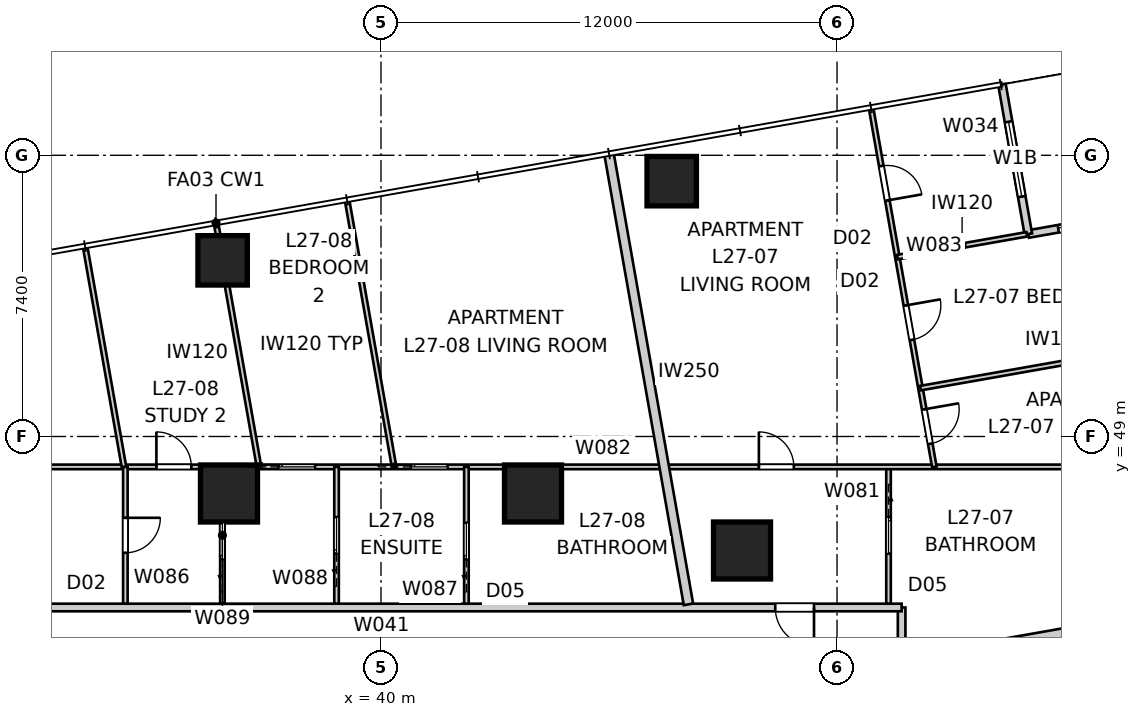
"""IFC4 building model, lengths in metres.
Left out: names, types, materials, properties, quantities, classifications, styles, units other than length and angle.
Written with IfcOpenShell. Run it as: python <this file> out.ifc"""

import sys

from ifc_helpers import new_model, si_unit, direction, frame, frame_2d, origin, origin_2d, place, context, subcontext, project, spatial, rectangle, extrude, element, fill, save


model = new_model("IFC4")
c1 = context("Model", 3, precision=1e-05, world=origin(), true_north=direction((0.0, 1.0)))
c2 = subcontext(c1, "Body", "Model", "MODEL_VIEW")
j1 = project(units=[si_unit("LENGTHUNIT", "METRE"), si_unit("PLANEANGLEUNIT", "RADIAN")], contexts=[c1])
p1 = place(None, origin())
s1 = spatial("IfcSite", under=j1, at=p1, CompositionType="ELEMENT")
p2 = place(p1, origin())
s2 = spatial("IfcBuilding", under=s1, at=p2, CompositionType="ELEMENT")
p3 = place(p2, frame((0.0, 0.0, 99.8)))
s3 = spatial("IfcBuildingStorey", under=s2, at=p3, CompositionType="ELEMENT", Elevation=99.8)
for number, where, z_axis, x_axis in (
    (1, (47.65, 55.719, 0.0), (0.0, 0.0, 1.0), (1.0, 0.0, 0.0)),
    (2, (35.833, 53.635, 0.0), (0.0, 0.0, 1.0), (1.0, 0.0, 0.0)),
):
    element("IfcColumn", number, at=place(p3, frame(where, z_axis=z_axis, x_axis=x_axis)), inside=s3, PredefinedType="COLUMN", context=c2, shape_type="SweptSolid", body=[
        extrude(rectangle(XDim=1.3, YDim=1.3, at=origin_2d()), origin(), (0.0, 0.0, 1.0), 3.4),
    ])
for number, where, z_axis, x_axis in (
    (3, (49.5, 46.0, 0.0), (0.0, 0.0, 1.0), (1.0, 0.0, 0.0)),
    (4, (44.0, 47.5, 0.0), (0.0, 0.0, 1.0), (1.0, 0.0, 0.0)),
    (5, (36.0, 47.5, 0.0), (0.0, 0.0, 1.0), (1.0, 0.0, 0.0)),
):
    element("IfcColumn", number, at=place(p3, frame(where, z_axis=z_axis, x_axis=x_axis)), inside=s3, PredefinedType="COLUMN", context=c2, shape_type="SweptSolid", body=[
        extrude(rectangle(XDim=1.5, YDim=1.5, at=origin_2d()), origin(), (0.0, 0.0, 1.0), 3.4),
    ])
p4 = place(p3, frame((60.974, 55.022, 0.0), z_axis=(0.0, 0.0, 1.0), x_axis=(-0.984808127031, -0.173646056486, 0.0)))
e6 = element("IfcWall", 6, at=p4, inside=s3, PredefinedType="SOLIDWALL", context=c2, shape_type="SweptSolid", body=[
    extrude(rectangle(XDim=4.0, YDim=0.2, at=frame_2d((2.0, 0.0))), origin(), (0.0, 0.0, 1.0), 3.25),
])
p5 = place(p4, frame((0.8, 0.0, 0.0)))
e7 = element("IfcOpeningElement", 7, at=p5, cuts=e6, PredefinedType="OPENING", context=c2, shape_type="SweptSolid", body=[
    extrude(rectangle(XDim=2.4, YDim=2.1, at=frame_2d((1.2, 1.05))), frame((0.0, 0.11, 0.0), z_axis=(0.0, -1.0, 0.0), x_axis=(1.0, 0.0, 0.0)), (0.0, 0.0, 1.0), 0.22),
])
p6 = place(p3, frame((57.034, 54.328, 0.0), z_axis=(0.0, 0.0, 1.0), x_axis=(-0.173646056486, 0.984808127031, 0.0)))
e8 = element("IfcWall", 8, at=p6, inside=s3, PredefinedType="SOLIDWALL", context=c2, shape_type="SweptSolid", body=[
    extrude(rectangle(XDim=4.0, YDim=0.2, at=frame_2d((2.0, 0.0))), origin(), (0.0, 0.0, 1.0), 3.25),
])
p7 = place(p6, frame((1.0, 0.0, 0.45)))
e9 = element("IfcOpeningElement", 9, at=p7, cuts=e8, PredefinedType="OPENING", context=c2, shape_type="SweptSolid", body=[
    extrude(rectangle(XDim=2.0, YDim=1.8, at=frame_2d((1.0, 0.9))), frame((0.0, 0.11, 0.0), z_axis=(0.0, -1.0, 0.0), x_axis=(1.0, 0.0, 0.0)), (0.0, 0.0, 1.0), 0.22),
])
p8 = place(p3, frame((53.7, 15.5, 0.0), z_axis=(0.0, 0.0, 1.0), x_axis=(0.0, 1.0, 0.0)))
e10 = element("IfcWall", 10, at=p8, inside=s3, PredefinedType="PARTITIONING", context=c2, shape_type="SweptSolid", body=[
    extrude(rectangle(XDim=29.0, YDim=0.2, at=frame_2d((14.5, 0.0))), origin(), (0.0, 0.0, 1.0), 3.25),
])
p9 = place(p8, frame((24.248, 0.0, 0.0)))
e11 = element("IfcOpeningElement", 11, at=p9, cuts=e10, PredefinedType="OPENING", context=c2, shape_type="SweptSolid", body=[
    extrude(rectangle(XDim=1.02, YDim=2.34, at=frame_2d((0.51, 1.17))), frame((0.0, 0.11, 0.0), z_axis=(0.0, -1.0, 0.0), x_axis=(1.0, 0.0, 0.0)), (0.0, 0.0, 1.0), 0.22),
])
p10 = place(p8, frame((2.976, 0.0, 0.0)))
e12 = element("IfcOpeningElement", 12, at=p10, cuts=e10, PredefinedType="OPENING", context=c2, shape_type="SweptSolid", body=[
    extrude(rectangle(XDim=1.02, YDim=2.1, at=frame_2d((0.51, 1.05))), frame((0.0, 0.11, 0.0), z_axis=(0.0, -1.0, 0.0), x_axis=(1.0, 0.0, 0.0)), (0.0, 0.0, 1.0), 0.22),
])
p11 = place(p8, frame((8.092, 0.0, 0.0)))
e13 = element("IfcOpeningElement", 13, at=p11, cuts=e10, PredefinedType="OPENING", context=c2, shape_type="SweptSolid", body=[
    extrude(rectangle(XDim=1.02, YDim=2.34, at=frame_2d((0.51, 1.17))), frame((0.0, 0.11, 0.0), z_axis=(0.0, -1.0, 0.0), x_axis=(1.0, 0.0, 0.0)), (0.0, 0.0, 1.0), 0.22),
])
p12 = place(p3, frame((53.7, 44.5, 0.0), z_axis=(0.0, 0.0, 1.0), x_axis=(-1.0, 0.0, 0.0)))
e14 = element("IfcWall", 14, at=p12, inside=s3, PredefinedType="PARTITIONING", context=c2, shape_type="SweptSolid", body=[
    extrude(rectangle(XDim=27.4, YDim=0.2, at=frame_2d((13.7, 0.0))), origin(), (0.0, 0.0, 1.0), 3.25),
])
p13 = place(p12, frame((24.056, 0.0, 0.0)))
e15 = element("IfcOpeningElement", 15, at=p13, cuts=e14, PredefinedType="OPENING", context=c2, shape_type="SweptSolid", body=[
    extrude(rectangle(XDim=1.02, YDim=2.1, at=frame_2d((0.51, 1.05))), frame((0.0, 0.11, 0.0), z_axis=(0.0, -1.0, 0.0), x_axis=(1.0, 0.0, 0.0)), (0.0, 0.0, 1.0), 0.22),
])
p14 = place(p12, frame((2.305, 0.0, 0.0)))
e16 = element("IfcOpeningElement", 16, at=p14, cuts=e14, PredefinedType="OPENING", context=c2, shape_type="SweptSolid", body=[
    extrude(rectangle(XDim=1.02, YDim=2.1, at=frame_2d((0.51, 1.05))), frame((0.0, 0.11, 0.0), z_axis=(0.0, -1.0, 0.0), x_axis=(1.0, 0.0, 0.0)), (0.0, 0.0, 1.0), 0.22),
])
p15 = place(p3, frame((62.797, 44.682, 0.0), z_axis=(0.0, 0.0, 1.0), x_axis=(-0.984810933893, -0.173630137029, 0.0)))
e17 = element("IfcWall", 17, at=p15, inside=s3, PredefinedType="PARTITIONING", context=c2, shape_type="SweptSolid", body=[
    extrude(rectangle(XDim=9.154, YDim=0.25, at=frame_2d((4.577, 0.0))), origin(), (0.0, 0.0, 1.0), 3.25),
])
p16 = place(p3, frame((45.999, 56.444, 0.0), z_axis=(0.0, 0.0, 1.0), x_axis=(0.173654664517, -0.984806609184, 0.0)))
e18 = element("IfcWall", 18, at=p16, inside=s3, PredefinedType="PARTITIONING", context=c2, shape_type="SweptSolid", body=[
    extrude(rectangle(XDim=12.044, YDim=0.25, at=frame_2d((6.022, 0.0))), origin(), (0.0, 0.0, 1.0), 3.25),
])
p17 = place(p3, frame((53.355, 48.2, 0.0), z_axis=(0.0, 0.0, 1.0), x_axis=(0.0, -1.0, 0.0)))
e19 = element("IfcWall", 19, at=p17, inside=s3, PredefinedType="PARTITIONING", context=c2, shape_type="SweptSolid", body=[
    extrude(rectangle(XDim=3.6, YDim=0.12, at=frame_2d((1.8, 0.0))), origin(), (0.0, 0.0, 1.0), 3.25),
])
p18 = place(p17, frame((1.32, 0.0, 0.0)))
e20 = element("IfcOpeningElement", 20, at=p18, cuts=e19, PredefinedType="OPENING", context=c2, shape_type="SweptSolid", body=[
    extrude(rectangle(XDim=0.96, YDim=2.1, at=frame_2d((0.48, 1.05))), frame((0.0, 0.07, 0.0), z_axis=(0.0, -1.0, 0.0), x_axis=(1.0, 0.0, 0.0)), (0.0, 0.0, 1.0), 0.14),
])
p19 = place(p3, frame((21.8, 48.2, 0.0), z_axis=(0.0, 0.0, 1.0), x_axis=(1.0, 0.0, 0.0)))
e21 = element("IfcWall", 21, at=p19, inside=s3, PredefinedType="PARTITIONING", context=c2, shape_type="SweptSolid", body=[
    extrude(rectangle(XDim=36.4, YDim=0.12, at=frame_2d((18.2, 0.0))), origin(), (0.0, 0.0, 1.0), 3.25),
])
p20 = place(p19, frame((7.441, 0.0, 0.0)))
e22 = element("IfcOpeningElement", 22, at=p20, cuts=e21, PredefinedType="OPENING", context=c2, shape_type="SweptSolid", body=[
    extrude(rectangle(XDim=0.92, YDim=2.34, at=frame_2d((0.46, 1.17))), frame((0.0, 0.07, 0.0), z_axis=(0.0, -1.0, 0.0), x_axis=(1.0, 0.0, 0.0)), (0.0, 0.0, 1.0), 0.14),
])
p21 = place(p19, frame((28.144, 0.0, 0.0)))
e23 = element("IfcOpeningElement", 23, at=p21, cuts=e21, PredefinedType="OPENING", context=c2, shape_type="SweptSolid", body=[
    extrude(rectangle(XDim=0.92, YDim=2.34, at=frame_2d((0.46, 1.17))), frame((0.0, 0.07, 0.0), z_axis=(0.0, -1.0, 0.0), x_axis=(1.0, 0.0, 0.0)), (0.0, 0.0, 1.0), 0.14),
])
p22 = place(p19, frame((12.29, 0.0, 0.0)))
e24 = element("IfcOpeningElement", 24, at=p22, cuts=e21, PredefinedType="OPENING", context=c2, shape_type="SweptSolid", body=[
    extrude(rectangle(XDim=0.92, YDim=2.34, at=frame_2d((0.46, 1.17))), frame((0.0, 0.07, 0.0), z_axis=(0.0, -1.0, 0.0), x_axis=(1.0, 0.0, 0.0)), (0.0, 0.0, 1.0), 0.14),
])
p23 = place(p19, frame((15.505, 0.0, 0.0)))
e25 = element("IfcOpeningElement", 25, at=p23, cuts=e21, PredefinedType="OPENING", context=c2, shape_type="SweptSolid", body=[
    extrude(rectangle(XDim=0.96, YDim=2.1, at=frame_2d((0.48, 1.05))), frame((0.0, 0.07, 0.0), z_axis=(0.0, -1.0, 0.0), x_axis=(1.0, 0.0, 0.0)), (0.0, 0.0, 1.0), 0.14),
])
p24 = place(p19, frame((18.991, 0.0, 0.0)))
e26 = element("IfcOpeningElement", 26, at=p24, cuts=e21, PredefinedType="OPENING", context=c2, shape_type="SweptSolid", body=[
    extrude(rectangle(XDim=0.96, YDim=2.1, at=frame_2d((0.48, 1.05))), frame((0.0, 0.07, 0.0), z_axis=(0.0, -1.0, 0.0), x_axis=(1.0, 0.0, 0.0)), (0.0, 0.0, 1.0), 0.14),
])
p25 = place(p3, frame((52.9, 57.62, 0.0), z_axis=(0.0, 0.0, 1.0), x_axis=(0.173642635155, -0.984808730291, 0.0)))
e27 = element("IfcWall", 27, at=p25, inside=s3, PredefinedType="PARTITIONING", context=c2, shape_type="SweptSolid", body=[
    extrude(rectangle(XDim=9.565, YDim=0.12, at=frame_2d((4.782, 0.0))), origin(), (0.0, 0.0, 1.0), 3.25),
])
p26 = place(p25, frame((1.525, 0.0, 0.0)))
e28 = element("IfcOpeningElement", 28, at=p26, cuts=e27, PredefinedType="OPENING", context=c2, shape_type="SweptSolid", body=[
    extrude(rectangle(XDim=0.92, YDim=2.34, at=frame_2d((0.46, 1.17))), frame((0.0, 0.07, 0.0), z_axis=(0.0, -1.0, 0.0), x_axis=(1.0, 0.0, 0.0)), (0.0, 0.0, 1.0), 0.14),
])
p27 = place(p25, frame((5.25, 0.0, 0.0)))
e29 = element("IfcOpeningElement", 29, at=p27, cuts=e27, PredefinedType="OPENING", context=c2, shape_type="SweptSolid", body=[
    extrude(rectangle(XDim=0.92, YDim=2.34, at=frame_2d((0.46, 1.17))), frame((0.0, 0.07, 0.0), z_axis=(0.0, -1.0, 0.0), x_axis=(1.0, 0.0, 0.0)), (0.0, 0.0, 1.0), 0.14),
])
p28 = place(p25, frame((8.028, 0.0, 0.0)))
e30 = element("IfcOpeningElement", 30, at=p28, cuts=e27, PredefinedType="OPENING", context=c2, shape_type="SweptSolid", body=[
    extrude(rectangle(XDim=0.92, YDim=2.34, at=frame_2d((0.46, 1.17))), frame((0.0, 0.07, 0.0), z_axis=(0.0, -1.0, 0.0), x_axis=(1.0, 0.0, 0.0)), (0.0, 0.0, 1.0), 0.14),
])
p29 = place(p3, frame((54.195, 50.273, 0.0), z_axis=(0.0, 0.0, 1.0), x_axis=(0.984807929323, 0.173647177755, 0.0)))
e31 = element("IfcWall", 31, at=p29, inside=s3, PredefinedType="PARTITIONING", context=c2, shape_type="SweptSolid", body=[
    extrude(rectangle(XDim=7.46, YDim=0.12, at=frame_2d((3.73, 0.0))), origin(), (0.0, 0.0, 1.0), 3.25),
])
p30 = place(p3, frame((53.588, 53.72, 0.0), z_axis=(0.0, 0.0, 1.0), x_axis=(0.984805572884, 0.173660541335, 0.0)))
e32 = element("IfcWall", 32, at=p30, inside=s3, PredefinedType="PARTITIONING", context=c2, shape_type="SweptSolid", body=[
    extrude(rectangle(XDim=3.46, YDim=0.12, at=frame_2d((1.73, 0.0))), origin(), (0.0, 0.0, 1.0), 3.25),
])
p31 = place(p3, frame((33.273, 48.2, 0.0), z_axis=(0.0, 0.0, 1.0), x_axis=(0.0, -1.0, 0.0)))
e33 = element("IfcWall", 33, at=p31, inside=s3, PredefinedType="PARTITIONING", context=c2, shape_type="SweptSolid", body=[
    extrude(rectangle(XDim=3.6, YDim=0.12, at=frame_2d((1.8, 0.0))), origin(), (0.0, 0.0, 1.0), 3.25),
])
p32 = place(p31, frame((1.34, 0.0, 0.0)))
e34 = element("IfcOpeningElement", 34, at=p32, cuts=e33, PredefinedType="OPENING", context=c2, shape_type="SweptSolid", body=[
    extrude(rectangle(XDim=0.92, YDim=2.34, at=frame_2d((0.46, 1.17))), frame((0.0, 0.07, 0.0), z_axis=(0.0, -1.0, 0.0), x_axis=(1.0, 0.0, 0.0)), (0.0, 0.0, 1.0), 0.14),
])
p33 = place(p3, frame((42.248, 44.6, 0.0), z_axis=(0.0, 0.0, 1.0), x_axis=(0.0, 1.0, 0.0)))
e35 = element("IfcWall", 35, at=p33, inside=s3, PredefinedType="PARTITIONING", context=c2, shape_type="SweptSolid", body=[
    extrude(rectangle(XDim=3.6, YDim=0.12, at=frame_2d((1.8, 0.0))), origin(), (0.0, 0.0, 1.0), 3.25),
])
p34 = place(p33, frame((1.17, 0.0, 0.0)))
e36 = element("IfcOpeningElement", 36, at=p34, cuts=e35, PredefinedType="OPENING", context=c2, shape_type="SweptSolid", body=[
    extrude(rectangle(XDim=0.96, YDim=2.1, at=frame_2d((0.48, 1.05))), frame((0.0, 0.07, 0.0), z_axis=(0.0, -1.0, 0.0), x_axis=(1.0, 0.0, 0.0)), (0.0, 0.0, 1.0), 0.14),
])
p35 = place(p3, frame((38.831, 44.6, 0.0), z_axis=(0.0, 0.0, 1.0), x_axis=(0.0, 1.0, 0.0)))
e37 = element("IfcWall", 37, at=p35, inside=s3, PredefinedType="PARTITIONING", context=c2, shape_type="SweptSolid", body=[
    extrude(rectangle(XDim=3.6, YDim=0.12, at=frame_2d((1.8, 0.0))), origin(), (0.0, 0.0, 1.0), 2.722),
])
p36 = place(p35, frame((1.32, 0.0, 0.0)))
e38 = element("IfcOpeningElement", 38, at=p36, cuts=e37, PredefinedType="OPENING", context=c2, shape_type="SweptSolid", body=[
    extrude(rectangle(XDim=0.96, YDim=2.1, at=frame_2d((0.48, 1.05))), frame((0.0, 0.07, 0.0), z_axis=(0.0, -1.0, 0.0), x_axis=(1.0, 0.0, 0.0)), (0.0, 0.0, 1.0), 0.14),
])
p37 = place(p3, frame((35.827, 44.6, 0.0), z_axis=(0.0, 0.0, 1.0), x_axis=(0.0, 1.0, 0.0)))
e39 = element("IfcWall", 39, at=p37, inside=s3, PredefinedType="PARTITIONING", context=c2, shape_type="SweptSolid", body=[
    extrude(rectangle(XDim=3.6, YDim=0.12, at=frame_2d((1.8, 0.0))), origin(), (0.0, 0.0, 1.0), 3.25),
])
p38 = place(p37, frame((1.17, 0.0, 0.0)))
e40 = element("IfcOpeningElement", 40, at=p38, cuts=e39, PredefinedType="OPENING", context=c2, shape_type="SweptSolid", body=[
    extrude(rectangle(XDim=0.96, YDim=2.1, at=frame_2d((0.48, 1.05))), frame((0.0, 0.07, 0.0), z_axis=(0.0, -1.0, 0.0), x_axis=(1.0, 0.0, 0.0)), (0.0, 0.0, 1.0), 0.14),
])
p39 = place(p3, frame((40.345, 48.2, 0.0), z_axis=(0.0, 0.0, 1.0), x_axis=(-0.17363617165, 0.984809869921, 0.0)))
e41 = element("IfcWall", 41, at=p39, inside=s3, PredefinedType="PARTITIONING", context=c2, shape_type="SweptSolid", body=[
    extrude(rectangle(XDim=7.096, YDim=0.12, at=frame_2d((3.548, 0.0))), origin(), (0.0, 0.0, 1.0), 3.25),
])
p40 = place(p3, frame((32.219, 53.973, 0.0), z_axis=(0.0, 0.0, 1.0), x_axis=(0.173623777139, -0.984812055172, 0.0)))
e42 = element("IfcWall", 42, at=p40, inside=s3, PredefinedType="PARTITIONING", context=c2, shape_type="SweptSolid", body=[
    extrude(rectangle(XDim=5.862, YDim=0.12, at=frame_2d((2.931, 0.0))), origin(), (0.0, 0.0, 1.0), 3.25),
])
p41 = place(p3, frame((36.791, 48.2, 0.0), z_axis=(0.0, 0.0, 1.0), x_axis=(-0.173630564586, 0.984810858511, 0.0)))
e43 = element("IfcWall", 43, at=p41, inside=s3, PredefinedType="PARTITIONING", context=c2, shape_type="SweptSolid", body=[
    extrude(rectangle(XDim=6.479, YDim=0.12, at=frame_2d((3.24, 0.0))), origin(), (0.0, 0.0, 1.0), 3.25),
])
p42 = place(p5, origin())
e44 = element("IfcDoor", 44, at=p42, inside=s3, OperationType="SLIDING_TO_LEFT", PredefinedType="DOOR", context=c2, shape_type="SweptSolid", body=[
    extrude(rectangle(XDim=2.4, YDim=2.1, at=frame_2d((1.2, 1.05))), frame((0.0, 0.025, 0.0), z_axis=(0.0, -1.0, 0.0), x_axis=(1.0, 0.0, 0.0)), (0.0, 0.0, 1.0), 0.05),
])
fill(e7, e44)
p43 = place(p7, origin())
e45 = element("IfcWindow", 45, at=p43, inside=s3, PartitioningType="SINGLE_PANEL", PredefinedType="WINDOW", context=c2, shape_type="SweptSolid", body=[
    extrude(rectangle(XDim=2.0, YDim=1.8, at=frame_2d((1.0, 0.9))), frame((0.0, 0.03, 0.0), z_axis=(0.0, -1.0, 0.0), x_axis=(1.0, 0.0, 0.0)), (0.0, 0.0, 1.0), 0.06),
])
fill(e9, e45)
p44 = place(p14, origin())
e46 = element("IfcDoor", 46, at=p44, inside=s3, OperationType="SINGLE_SWING_LEFT", PredefinedType="DOOR", context=c2, shape_type="SweptSolid", body=[
    extrude(rectangle(XDim=1.02, YDim=2.1, at=frame_2d((0.51, 1.05))), frame((0.0, 0.025, 0.0), z_axis=(0.0, -1.0, 0.0), x_axis=(1.0, 0.0, 0.0)), (0.0, 0.0, 1.0), 0.05),
])
fill(e16, e46)
p45 = place(p32, origin())
e47 = element("IfcDoor", 47, at=p45, inside=s3, OperationType="SINGLE_SWING_LEFT", PredefinedType="DOOR", context=c2, shape_type="SweptSolid", body=[
    extrude(rectangle(XDim=0.92, YDim=2.34, at=frame_2d((0.46, 1.17))), frame((0.0, 0.025, 0.0), z_axis=(0.0, -1.0, 0.0), x_axis=(1.0, 0.0, 0.0)), (0.0, 0.0, 1.0), 0.05),
])
fill(e34, e47)
p46 = place(p21, origin())
e48 = element("IfcDoor", 48, at=p46, inside=s3, OperationType="SINGLE_SWING_LEFT", PredefinedType="DOOR", context=c2, shape_type="SweptSolid", body=[
    extrude(rectangle(XDim=0.92, YDim=2.34, at=frame_2d((0.46, 1.17))), frame((0.0, 0.025, 0.0), z_axis=(0.0, -1.0, 0.0), x_axis=(1.0, 0.0, 0.0)), (0.0, 0.0, 1.0), 0.05),
])
fill(e23, e48)
p47 = place(p18, origin())
e49 = element("IfcDoor", 49, at=p47, inside=s3, OperationType="SLIDING_TO_LEFT", PredefinedType="DOOR", context=c2, shape_type="SweptSolid", body=[
    extrude(rectangle(XDim=0.96, YDim=2.1, at=frame_2d((0.48, 1.05))), frame((0.0, 0.025, 0.0), z_axis=(0.0, -1.0, 0.0), x_axis=(1.0, 0.0, 0.0)), (0.0, 0.0, 1.0), 0.05),
])
fill(e20, e49)
p48 = place(p38, origin())
e50 = element("IfcDoor", 50, at=p48, inside=s3, OperationType="SLIDING_TO_LEFT", PredefinedType="DOOR", context=c2, shape_type="SweptSolid", body=[
    extrude(rectangle(XDim=0.96, YDim=2.1, at=frame_2d((0.48, 1.05))), frame((0.0, 0.025, 0.0), z_axis=(0.0, -1.0, 0.0), x_axis=(1.0, 0.0, 0.0)), (0.0, 0.0, 1.0), 0.05),
])
fill(e40, e50)
p49 = place(p22, origin())
e51 = element("IfcDoor", 51, at=p49, inside=s3, OperationType="SINGLE_SWING_LEFT", PredefinedType="DOOR", context=c2, shape_type="SweptSolid", body=[
    extrude(rectangle(XDim=0.92, YDim=2.34, at=frame_2d((0.46, 1.17))), frame((0.0, 0.025, 0.0), z_axis=(0.0, -1.0, 0.0), x_axis=(1.0, 0.0, 0.0)), (0.0, 0.0, 1.0), 0.05),
])
fill(e24, e51)
p50 = place(p26, origin())
e52 = element("IfcDoor", 52, at=p50, inside=s3, OperationType="SINGLE_SWING_RIGHT", PredefinedType="DOOR", context=c2, shape_type="SweptSolid", body=[
    extrude(rectangle(XDim=0.92, YDim=2.34, at=frame_2d((0.46, 1.17))), frame((0.0, 0.025, 0.0), z_axis=(0.0, -1.0, 0.0), x_axis=(1.0, 0.0, 0.0)), (0.0, 0.0, 1.0), 0.05),
])
fill(e28, e52)
p51 = place(p27, origin())
e53 = element("IfcDoor", 53, at=p51, inside=s3, OperationType="SINGLE_SWING_LEFT", PredefinedType="DOOR", context=c2, shape_type="SweptSolid", body=[
    extrude(rectangle(XDim=0.92, YDim=2.34, at=frame_2d((0.46, 1.17))), frame((0.0, 0.025, 0.0), z_axis=(0.0, -1.0, 0.0), x_axis=(1.0, 0.0, 0.0)), (0.0, 0.0, 1.0), 0.05),
])
fill(e29, e53)
p52 = place(p28, origin())
e54 = element("IfcDoor", 54, at=p52, inside=s3, OperationType="SINGLE_SWING_LEFT", PredefinedType="DOOR", context=c2, shape_type="SweptSolid", body=[
    extrude(rectangle(XDim=0.92, YDim=2.34, at=frame_2d((0.46, 1.17))), frame((0.0, 0.025, 0.0), z_axis=(0.0, -1.0, 0.0), x_axis=(1.0, 0.0, 0.0)), (0.0, 0.0, 1.0), 0.05),
])
fill(e30, e54)
p53 = place(p36, origin())
e55 = element("IfcDoor", 55, at=p53, inside=s3, OperationType="SLIDING_TO_LEFT", PredefinedType="DOOR", context=c2, shape_type="SweptSolid", body=[
    extrude(rectangle(XDim=0.96, YDim=2.1, at=frame_2d((0.48, 1.05))), frame((0.0, 0.025, 0.0), z_axis=(0.0, -1.0, 0.0), x_axis=(1.0, 0.0, 0.0)), (0.0, 0.0, 1.0), 0.05),
])
fill(e38, e55)
p54 = place(p23, origin())
e56 = element("IfcDoor", 56, at=p54, inside=s3, OperationType="SLIDING_TO_LEFT", PredefinedType="DOOR", context=c2, shape_type="SweptSolid", body=[
    extrude(rectangle(XDim=0.96, YDim=2.1, at=frame_2d((0.48, 1.05))), frame((0.0, 0.025, 0.0), z_axis=(0.0, -1.0, 0.0), x_axis=(1.0, 0.0, 0.0)), (0.0, 0.0, 1.0), 0.05),
])
fill(e25, e56)
p55 = place(p34, origin())
e57 = element("IfcDoor", 57, at=p55, inside=s3, OperationType="SLIDING_TO_LEFT", PredefinedType="DOOR", context=c2, shape_type="SweptSolid", body=[
    extrude(rectangle(XDim=0.96, YDim=2.1, at=frame_2d((0.48, 1.05))), frame((0.0, 0.025, 0.0), z_axis=(0.0, -1.0, 0.0), x_axis=(1.0, 0.0, 0.0)), (0.0, 0.0, 1.0), 0.05),
])
fill(e36, e57)
p56 = place(p24, origin())
e58 = element("IfcDoor", 58, at=p56, inside=s3, OperationType="SLIDING_TO_LEFT", PredefinedType="DOOR", context=c2, shape_type="SweptSolid", body=[
    extrude(rectangle(XDim=0.96, YDim=2.1, at=frame_2d((0.48, 1.05))), frame((0.0, 0.025, 0.0), z_axis=(0.0, -1.0, 0.0), x_axis=(1.0, 0.0, 0.0)), (0.0, 0.0, 1.0), 0.05),
])
fill(e26, e58)
save(model, sys.argv[1])
